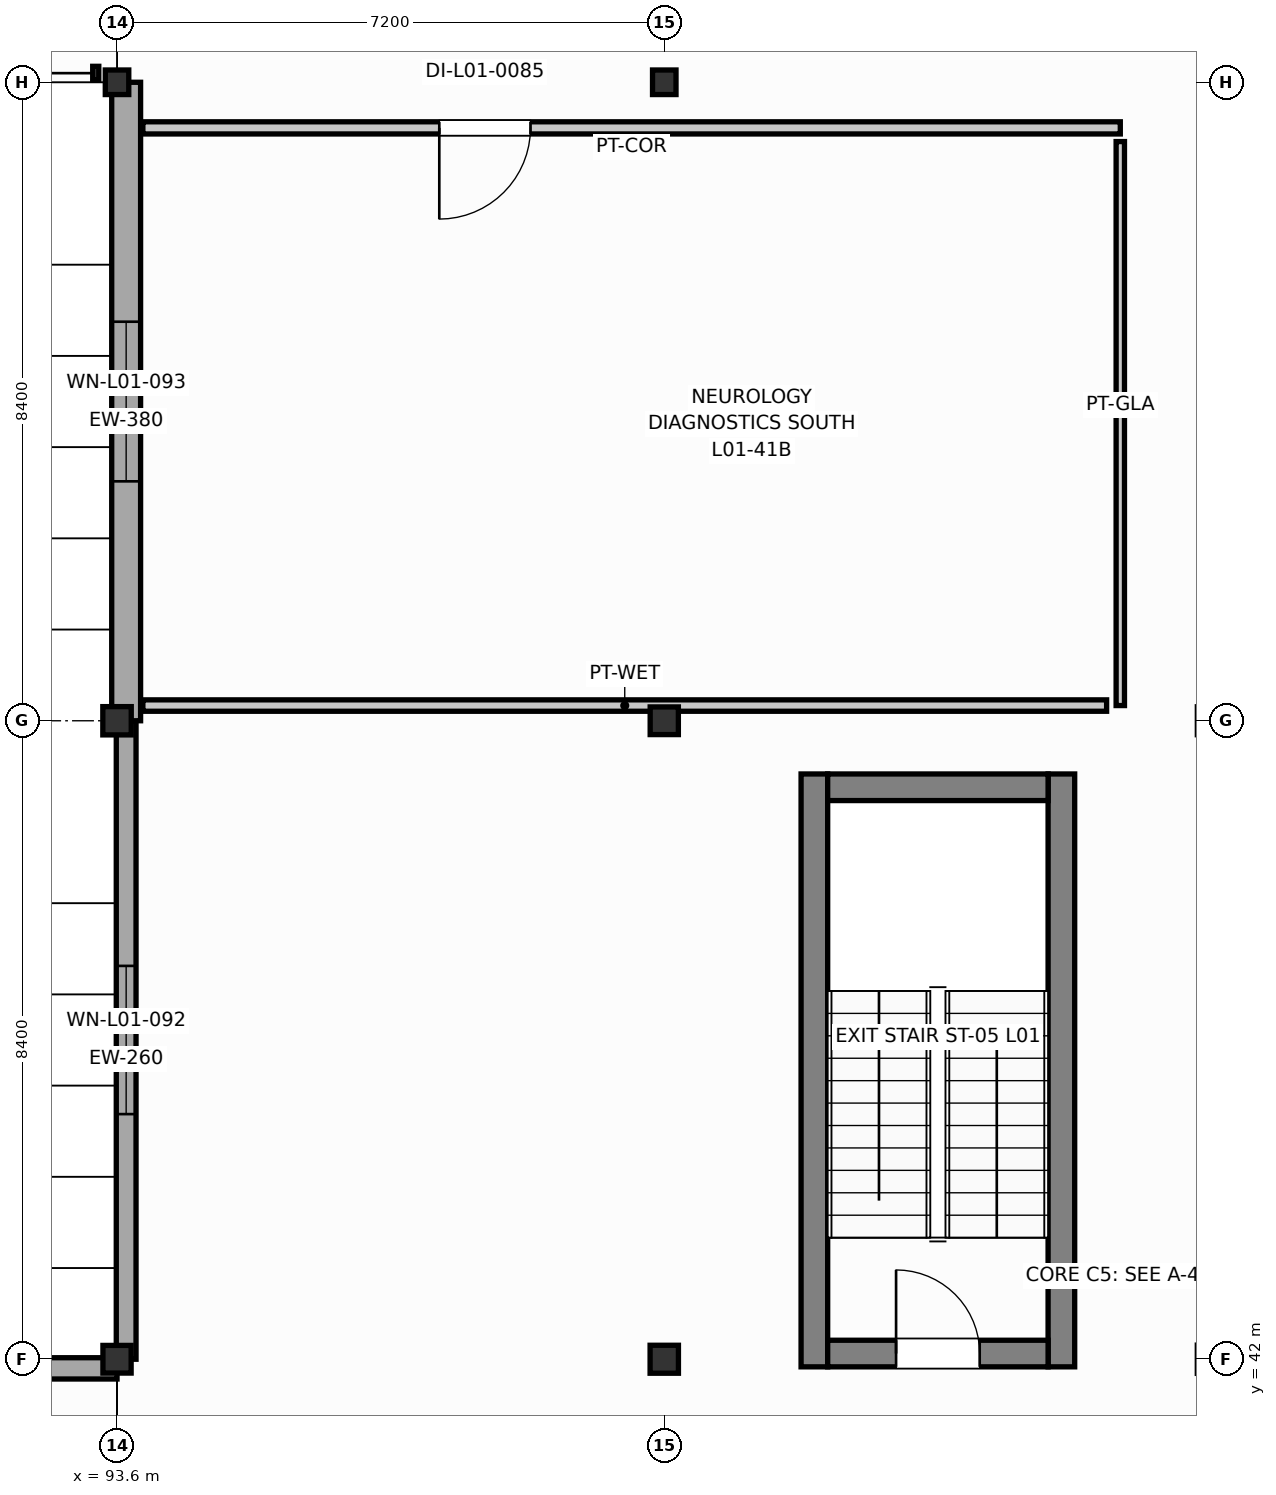
"""IFC4 building model, lengths in metres.
Left out: names, types, materials, properties, quantities, classifications, styles, units other than length and angle.
Written with IfcOpenShell. Run it as: python <this file> out.ifc"""

import sys

from ifc_helpers import new_model, si_unit, direction, frame, frame_2d, origin, origin_2d, place, context, subcontext, project, spatial, rectangle, i_section, extrude, element, fill, save


model = new_model("IFC4")
c1 = context("Model", 3, precision=1e-05, world=origin(), true_north=direction((0.0, 1.0)))
c2 = subcontext(c1, "Body", "Model", "MODEL_VIEW")
j1 = project(units=[si_unit("LENGTHUNIT", "METRE"), si_unit("PLANEANGLEUNIT", "RADIAN")], contexts=[c1])
p1 = place(None, origin())
s1 = spatial("IfcSite", under=j1, at=p1, CompositionType="ELEMENT")
p2 = place(p1, origin())
s2 = spatial("IfcBuilding", under=s1, at=p2, CompositionType="ELEMENT")
p3 = place(p2, frame((0.0, 0.0, 4.8)))
s3 = spatial("IfcBuildingStorey", under=s2, at=p3, CompositionType="ELEMENT", Elevation=4.8)
p4 = place(p3, frame((93.6, 42.0, 0.0), z_axis=(0.0, 0.0, 1.0), x_axis=(1.0, 0.0, 0.0)))
e1 = element("IfcColumn", 1, at=p4, inside=s3, PredefinedType="COLUMN", context=c2, shape_type="SweptSolid", body=[
    extrude(i_section(OverallWidth=0.371, OverallDepth=0.364, WebThickness=0.013, FlangeThickness=0.022, FilletRadius=0.02, at=origin_2d()), origin(), (0.0, 0.0, 1.0), 4.2),
])
p5 = place(p3, frame((93.6, 50.4, 0.0), z_axis=(0.0, 0.0, 1.0), x_axis=(1.0, 0.0, 0.0)))
e2 = element("IfcColumn", 2, at=p5, inside=s3, PredefinedType="COLUMN", context=c2, shape_type="SweptSolid", body=[
    extrude(i_section(OverallWidth=0.374, OverallDepth=0.372, WebThickness=0.016, FlangeThickness=0.026, FilletRadius=0.02, at=origin_2d()), origin(), (0.0, 0.0, 1.0), 4.2),
])
p6 = place(p3, frame((93.6, 58.8, 0.0), z_axis=(0.0, 0.0, 1.0), x_axis=(1.0, 0.0, 0.0)))
e3 = element("IfcColumn", 3, at=p6, inside=s3, PredefinedType="COLUMN", context=c2, shape_type="SweptSolid", body=[
    extrude(i_section(OverallWidth=0.309, OverallDepth=0.323, WebThickness=0.014, FlangeThickness=0.023, FilletRadius=0.016, at=origin_2d()), origin(), (0.0, 0.0, 1.0), 4.2),
])
p7 = place(p3, frame((100.8, 42.0, 0.0), z_axis=(0.0, 0.0, 1.0), x_axis=(1.0, 0.0, 0.0)))
e4 = element("IfcColumn", 4, at=p7, inside=s3, PredefinedType="COLUMN", context=c2, shape_type="SweptSolid", body=[
    extrude(i_section(OverallWidth=0.373, OverallDepth=0.368, WebThickness=0.015, FlangeThickness=0.024, FilletRadius=0.02, at=origin_2d()), origin(), (0.0, 0.0, 1.0), 4.2),
])
p8 = place(p3, frame((100.8, 50.4, 0.0), z_axis=(0.0, 0.0, 1.0), x_axis=(1.0, 0.0, 0.0)))
e5 = element("IfcColumn", 5, at=p8, inside=s3, PredefinedType="COLUMN", context=c2, shape_type="SweptSolid", body=[
    extrude(i_section(OverallWidth=0.371, OverallDepth=0.364, WebThickness=0.013, FlangeThickness=0.022, FilletRadius=0.02, at=origin_2d()), origin(), (0.0, 0.0, 1.0), 4.2),
])
p9 = place(p3, frame((100.8, 58.8, 0.0), z_axis=(0.0, 0.0, 1.0), x_axis=(1.0, 0.0, 0.0)))
e6 = element("IfcColumn", 6, at=p9, inside=s3, PredefinedType="COLUMN", context=c2, shape_type="SweptSolid", body=[
    extrude(i_section(OverallWidth=0.309, OverallDepth=0.323, WebThickness=0.014, FlangeThickness=0.023, FilletRadius=0.016, at=origin_2d()), origin(), (0.0, 0.0, 1.0), 4.2),
])
for number, where, z_axis, x_axis in (
    (7, (102.775, 41.9, 0.0), (0.0, 0.0, 1.0), (0.0, 1.0, 0.0)),
    (8, (106.025, 41.9, 0.0), (0.0, 0.0, 1.0), (0.0, 1.0, 0.0)),
):
    element("IfcWall", number, at=place(p3, frame(where, z_axis=z_axis, x_axis=x_axis)), inside=s3, PredefinedType="SHEAR", context=c2, shape_type="SweptSolid", body=[
        extrude(rectangle(XDim=7.8, YDim=0.35, at=frame_2d((3.9, 0.0))), origin(), (0.0, 0.0, 1.0), 3.98),
    ])
p10 = place(p3, frame((102.95, 49.525, 0.0), z_axis=(0.0, 0.0, 1.0), x_axis=(1.0, 0.0, 0.0)))
e9 = element("IfcWall", 9, at=p10, inside=s3, PredefinedType="SHEAR", context=c2, shape_type="SweptSolid", body=[
    extrude(rectangle(XDim=2.9, YDim=0.35, at=frame_2d((1.45, 0.0))), origin(), (0.0, 0.0, 1.0), 3.98),
])
p11 = place(p3, frame((102.95, 42.075, 0.0), z_axis=(0.0, 0.0, 1.0), x_axis=(1.0, 0.0, 0.0)))
e10 = element("IfcWall", 10, at=p11, inside=s3, PredefinedType="SHEAR", context=c2, shape_type="SweptSolid", body=[
    extrude(rectangle(XDim=2.9, YDim=0.35, at=frame_2d((1.45, 0.0))), origin(), (0.0, 0.0, 1.0), 3.98),
])
p12 = place(p11, frame((0.9, 0.0, 0.0)))
e11 = element("IfcOpeningElement", 11, at=p12, cuts=e10, PredefinedType="OPENING", context=c2, shape_type="SweptSolid", body=[
    extrude(rectangle(XDim=1.1, YDim=2.15, at=frame_2d((0.55, 1.075))), frame((0.0, 0.185, 0.0), z_axis=(0.0, -1.0, 0.0), x_axis=(1.0, 0.0, 0.0)), (0.0, 0.0, 1.0), 0.37),
])
p13 = place(p3, frame((86.4, 41.88, 0.0), z_axis=(0.0, 0.0, 1.0), x_axis=(1.0, 0.0, 0.0)))
e12 = element("IfcWall", 12, at=p13, inside=s3, PredefinedType="SOLIDWALL", context=c2, shape_type="SweptSolid", body=[
    extrude(rectangle(XDim=7.2, YDim=0.28, at=frame_2d((3.6, 0.0))), origin(), (0.0, 0.0, 1.0), 3.325),
])
p14 = place(p13, frame((2.625, 0.0, 0.95)))
e13 = element("IfcOpeningElement", 13, at=p14, cuts=e12, PredefinedType="OPENING", context=c2, shape_type="SweptSolid", body=[
    extrude(rectangle(XDim=1.95, YDim=1.55, at=frame_2d((0.975, 0.775))), frame((0.0, 0.15, 0.0), z_axis=(0.0, -1.0, 0.0), x_axis=(1.0, 0.0, 0.0)), (0.0, 0.0, 1.0), 0.3),
])
p15 = place(p3, frame((93.72, 42.0, 0.0), z_axis=(0.0, 0.0, 1.0), x_axis=(0.0, 1.0, 0.0)))
e14 = element("IfcWall", 14, at=p15, inside=s3, PredefinedType="SOLIDWALL", context=c2, shape_type="SweptSolid", body=[
    extrude(rectangle(XDim=8.4, YDim=0.26, at=frame_2d((4.2, 0.0))), origin(), (0.0, 0.0, 1.0), 3.405),
])
p16 = place(p15, frame((3.225, 0.0, 0.95)))
e15 = element("IfcOpeningElement", 15, at=p16, cuts=e14, PredefinedType="OPENING", context=c2, shape_type="SweptSolid", body=[
    extrude(rectangle(XDim=1.95, YDim=1.75, at=frame_2d((0.975, 0.875))), frame((0.0, 0.14, 0.0), z_axis=(0.0, -1.0, 0.0), x_axis=(1.0, 0.0, 0.0)), (0.0, 0.0, 1.0), 0.28),
])
p17 = place(p3, frame((93.72, 50.4, 0.0), z_axis=(0.0, 0.0, 1.0), x_axis=(0.0, 1.0, 0.0)))
e16 = element("IfcWall", 16, at=p17, inside=s3, PredefinedType="SOLIDWALL", context=c2, shape_type="SweptSolid", body=[
    extrude(rectangle(XDim=8.4, YDim=0.38, at=frame_2d((4.2, 0.0))), origin(), (0.0, 0.0, 1.0), 3.476),
])
p18 = place(p17, frame((3.15, 0.0, 0.95)))
e17 = element("IfcOpeningElement", 17, at=p18, cuts=e16, PredefinedType="OPENING", context=c2, shape_type="SweptSolid", body=[
    extrude(rectangle(XDim=2.1, YDim=1.15, at=frame_2d((1.05, 0.575))), frame((0.0, 0.2, 0.0), z_axis=(0.0, -1.0, 0.0), x_axis=(1.0, 0.0, 0.0)), (0.0, 0.0, 1.0), 0.4),
])
p19 = place(p3, frame((93.94, 58.2, 0.0), z_axis=(0.0, 0.0, 1.0), x_axis=(1.0, 0.0, 0.0)))
e18 = element("IfcWall", 18, at=p19, inside=s3, PredefinedType="PARTITIONING", context=c2, shape_type="SweptSolid", body=[
    extrude(rectangle(XDim=12.86, YDim=0.16, at=frame_2d((6.43, 0.0))), origin(), (0.0, 0.0, 1.0), 3.479),
])
p20 = place(p19, frame((3.9, 0.0, 0.0)))
e19 = element("IfcOpeningElement", 19, at=p20, cuts=e18, PredefinedType="OPENING", context=c2, shape_type="SweptSolid", body=[
    extrude(rectangle(XDim=1.2, YDim=2.15, at=frame_2d((0.6, 1.075))), frame((0.0, 0.09, 0.0), z_axis=(0.0, -1.0, 0.0), x_axis=(1.0, 0.0, 0.0)), (0.0, 0.0, 1.0), 0.18),
])
p21 = place(p3, frame((106.8, 58.02, 0.0), z_axis=(0.0, 0.0, 1.0), x_axis=(0.0, -1.0, 0.0)))
e20 = element("IfcWall", 20, at=p21, inside=s3, PredefinedType="MOVABLE", context=c2, shape_type="SweptSolid", body=[
    extrude(rectangle(XDim=7.42, YDim=0.11, at=frame_2d((3.71, 0.0))), origin(), (0.0, 0.0, 1.0), 3.535),
])
p22 = place(p3, frame((106.62, 50.6, 0.0), z_axis=(0.0, 0.0, 1.0), x_axis=(-1.0, 0.0, 0.0)))
e21 = element("IfcWall", 21, at=p22, inside=s3, PredefinedType="PLUMBINGWALL", context=c2, shape_type="SweptSolid", body=[
    extrude(rectangle(XDim=12.68, YDim=0.15, at=frame_2d((6.34, 0.0))), origin(), (0.0, 0.0, 1.0), 3.408),
])
p23 = place(p12, origin())
e22 = element("IfcDoor", 22, at=p23, inside=s3, OperationType="SINGLE_SWING_LEFT", PredefinedType="DOOR", context=c2, shape_type="SweptSolid", body=[
    extrude(rectangle(XDim=1.1, YDim=2.15, at=frame_2d((0.55, 1.075))), frame((0.0, 0.025, 0.0), z_axis=(0.0, -1.0, 0.0), x_axis=(1.0, 0.0, 0.0)), (0.0, 0.0, 1.0), 0.05),
])
fill(e11, e22)
p24 = place(p16, origin())
e23 = element("IfcWindow", 23, at=p24, inside=s3, PartitioningType="SINGLE_PANEL", PredefinedType="WINDOW", context=c2, shape_type="SweptSolid", body=[
    extrude(rectangle(XDim=1.95, YDim=1.75, at=frame_2d((0.975, 0.875))), frame((0.0, 0.03, 0.0), z_axis=(0.0, -1.0, 0.0), x_axis=(1.0, 0.0, 0.0)), (0.0, 0.0, 1.0), 0.06),
])
fill(e15, e23)
p25 = place(p18, origin())
e24 = element("IfcWindow", 24, at=p25, inside=s3, PartitioningType="SINGLE_PANEL", PredefinedType="WINDOW", context=c2, shape_type="SweptSolid", body=[
    extrude(rectangle(XDim=2.1, YDim=1.15, at=frame_2d((1.05, 0.575))), frame((0.0, 0.03, 0.0), z_axis=(0.0, -1.0, 0.0), x_axis=(1.0, 0.0, 0.0)), (0.0, 0.0, 1.0), 0.06),
])
fill(e17, e24)
p26 = place(p20, frame((1.2, 0.0, 0.0), z_axis=(0.0, 0.0, 1.0), x_axis=(-1.0, 0.0, 0.0)))
e25 = element("IfcDoor", 25, at=p26, inside=s3, OperationType="SINGLE_SWING_RIGHT", PredefinedType="DOOR", context=c2, shape_type="SweptSolid", body=[
    extrude(rectangle(XDim=1.2, YDim=2.15, at=frame_2d((0.6, 1.075))), frame((0.0, 0.025, 0.0), z_axis=(0.0, -1.0, 0.0), x_axis=(1.0, 0.0, 0.0)), (0.0, 0.0, 1.0), 0.05),
])
fill(e19, e25)
save(model, sys.argv[1])
